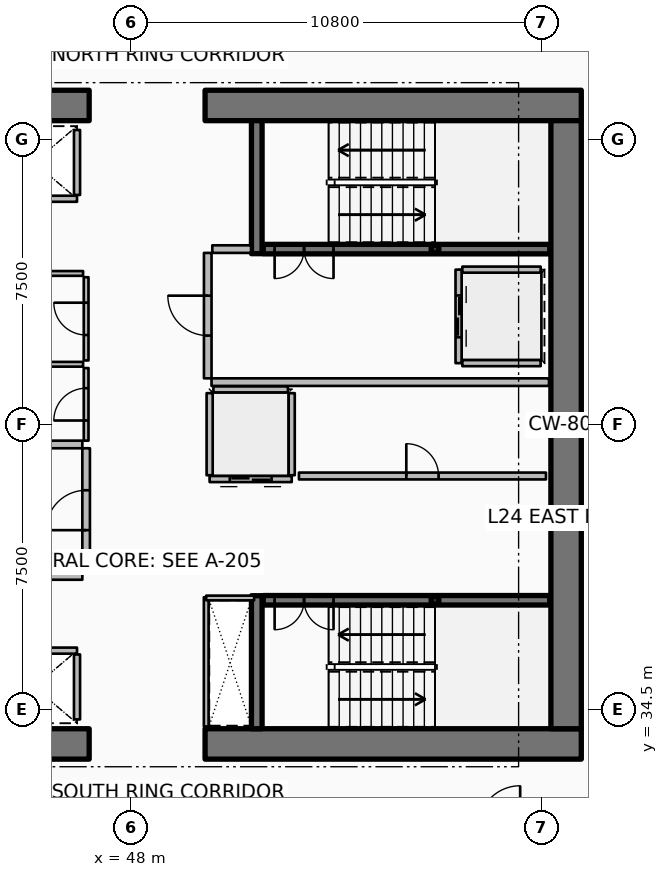
"""IFC4 building model, lengths in metres.
Left out: names, types, materials, properties, quantities, classifications, styles, units other than length and angle.
Written with IfcOpenShell. Run it as: python <this file> out.ifc"""

import sys

from ifc_helpers import new_model, si_unit, direction, frame, frame_2d, origin, origin_2d, place, context, subcontext, project, spatial, rectangle, hollow_rectangle, extrude, element, fill, save


model = new_model("IFC4")
c1 = context("Model", 3, precision=1e-05, world=origin(), true_north=direction((0.0, 1.0)))
c2 = subcontext(c1, "Body", "Model", "MODEL_VIEW")
j1 = project(units=[si_unit("LENGTHUNIT", "METRE"), si_unit("PLANEANGLEUNIT", "RADIAN")], contexts=[c1])
p1 = place(None, origin())
s1 = spatial("IfcSite", under=j1, at=p1, CompositionType="ELEMENT")
p2 = place(p1, origin())
s2 = spatial("IfcBuilding", under=s1, at=p2, CompositionType="ELEMENT")
p3 = place(p2, frame((0.0, 0.0, 97.65)))
s3 = spatial("IfcBuildingStorey", under=s2, at=p3, CompositionType="ELEMENT", Elevation=97.65)
p4 = place(p3, frame((37.0, 33.6, 0.0), z_axis=(0.0, 0.0, 1.0), x_axis=(1.0, 0.0, 0.0)))
e1 = element("IfcWall", 1, at=p4, inside=s3, PredefinedType="SHEAR", context=c2, shape_type="SweptSolid", body=[
    extrude(rectangle(XDim=9.9, YDim=0.8, at=frame_2d((4.95, 0.0))), origin(), (0.0, 0.0, 1.0), 3.75),
])
p5 = place(p3, frame((49.95, 33.6, 0.0), z_axis=(0.0, 0.0, 1.0), x_axis=(1.0, 0.0, 0.0)))
e2 = element("IfcWall", 2, at=p5, inside=s3, PredefinedType="SHEAR", context=c2, shape_type="SweptSolid", body=[
    extrude(rectangle(XDim=9.9, YDim=0.8, at=frame_2d((4.95, 0.0))), origin(), (0.0, 0.0, 1.0), 3.75),
])
p6 = place(p3, frame((37.0, 50.4, 0.0), z_axis=(0.0, 0.0, 1.0), x_axis=(1.0, 0.0, 0.0)))
e3 = element("IfcWall", 3, at=p6, inside=s3, PredefinedType="SHEAR", context=c2, shape_type="SweptSolid", body=[
    extrude(rectangle(XDim=9.9, YDim=0.8, at=frame_2d((4.95, 0.0))), origin(), (0.0, 0.0, 1.0), 3.75),
])
p7 = place(p3, frame((49.95, 50.4, 0.0), z_axis=(0.0, 0.0, 1.0), x_axis=(1.0, 0.0, 0.0)))
e4 = element("IfcWall", 4, at=p7, inside=s3, PredefinedType="SHEAR", context=c2, shape_type="SweptSolid", body=[
    extrude(rectangle(XDim=9.9, YDim=0.8, at=frame_2d((4.95, 0.0))), origin(), (0.0, 0.0, 1.0), 3.75),
])
p8 = place(p3, frame((59.45, 34.0, 0.0), z_axis=(0.0, 0.0, 1.0), x_axis=(0.0, 1.0, 0.0)))
e5 = element("IfcWall", 5, at=p8, inside=s3, PredefinedType="SHEAR", context=c2, shape_type="SweptSolid", body=[
    extrude(rectangle(XDim=16.0, YDim=0.8, at=frame_2d((8.0, 0.0))), origin(), (0.0, 0.0, 1.0), 3.75),
])
for number, where, z_axis, x_axis in (
    (6, (51.31, 46.5, 0.0), (0.0, 0.0, 1.0), (0.0, 1.0, 0.0)),
    (7, (51.31, 34.0, 0.0), (0.0, 0.0, 1.0), (0.0, 1.0, 0.0)),
):
    element("IfcWall", number, at=place(p3, frame(where, z_axis=z_axis, x_axis=x_axis)), inside=s3, PredefinedType="SHEAR", context=c2, shape_type="SweptSolid", body=[
        extrude(rectangle(XDim=3.5, YDim=0.28, at=frame_2d((1.75, 0.0))), origin(), (0.0, 0.0, 1.0), 3.75),
    ])
for number, where, z_axis, x_axis in (
    (8, (56.0, 46.62, 0.0), (0.0, 0.0, 1.0), (1.0, 0.0, 0.0)),
    (9, (56.0, 37.38, 0.0), (0.0, 0.0, 1.0), (1.0, 0.0, 0.0)),
):
    element("IfcColumn", number, at=place(p3, frame(where, z_axis=z_axis, x_axis=x_axis)), inside=s3, PredefinedType="COLUMN", context=c2, shape_type="SweptSolid", body=[
        extrude(hollow_rectangle(XDim=0.2, YDim=0.2, WallThickness=0.01, InnerFilletRadius=0.01, OuterFilletRadius=0.02, at=origin_2d()), origin(), (0.0, 0.0, 1.0), 1.67),
    ])
p9 = place(p3, frame((51.48, 46.62, 0.0), z_axis=(0.0, 0.0, 1.0), x_axis=(1.0, 0.0, 0.0)))
e10 = element("IfcWall", 10, at=p9, inside=s3, PredefinedType="SOLIDWALL", context=c2, shape_type="SweptSolid", body=[
    extrude(rectangle(XDim=7.54, YDim=0.25, at=frame_2d((3.77, 0.0))), origin(), (0.0, 0.0, 1.0), 3.5),
])
p10 = place(p9, frame((0.3, 0.0, 0.0)))
e11 = element("IfcOpeningElement", 11, at=p10, cuts=e10, PredefinedType="OPENING", context=c2, shape_type="SweptSolid", body=[
    extrude(rectangle(XDim=1.55, YDim=2.15, at=frame_2d((0.775, 1.075))), frame((0.0, 0.135, 0.0), z_axis=(0.0, -1.0, 0.0), x_axis=(1.0, 0.0, 0.0)), (0.0, 0.0, 1.0), 0.27),
])
p11 = place(p3, frame((51.48, 37.38, 0.0), z_axis=(0.0, 0.0, 1.0), x_axis=(1.0, 0.0, 0.0)))
e12 = element("IfcWall", 12, at=p11, inside=s3, PredefinedType="SOLIDWALL", context=c2, shape_type="SweptSolid", body=[
    extrude(rectangle(XDim=7.54, YDim=0.25, at=frame_2d((3.77, 0.0))), origin(), (0.0, 0.0, 1.0), 3.5),
])
p12 = place(p11, frame((0.3, 0.0, 0.0)))
e13 = element("IfcOpeningElement", 13, at=p12, cuts=e12, PredefinedType="OPENING", context=c2, shape_type="SweptSolid", body=[
    extrude(rectangle(XDim=1.55, YDim=2.15, at=frame_2d((0.775, 1.075))), frame((0.0, 0.135, 0.0), z_axis=(0.0, -1.0, 0.0), x_axis=(1.0, 0.0, 0.0)), (0.0, 0.0, 1.0), 0.27),
])
p13 = place(p3, frame((46.58, 47.945, 0.0), z_axis=(0.0, 0.0, 1.0), x_axis=(-1.0, 0.0, 0.0)))
e14 = element("IfcWall", 14, at=p13, inside=s3, PredefinedType="PARTITIONING", context=c2, shape_type="SweptSolid", body=[
    extrude(rectangle(XDim=2.26, YDim=0.16, at=frame_2d((1.13, 0.0))), origin(), (0.0, 0.0, 1.0), 3.5),
])
p14 = place(p3, frame((46.58, 48.045, 0.0), z_axis=(0.0, 0.0, 1.0), x_axis=(0.0, 1.0, 0.0)))
e15 = element("IfcWall", 15, at=p14, inside=s3, PredefinedType="PARTITIONING", context=c2, shape_type="SweptSolid", body=[
    extrude(rectangle(XDim=1.71, YDim=0.16, at=frame_2d((0.855, 0.0))), origin(), (0.0, 0.0, 1.0), 3.5),
])
p15 = place(p3, frame((44.32, 36.055, 0.0), z_axis=(0.0, 0.0, 1.0), x_axis=(1.0, 0.0, 0.0)))
e16 = element("IfcWall", 16, at=p15, inside=s3, PredefinedType="PARTITIONING", context=c2, shape_type="SweptSolid", body=[
    extrude(rectangle(XDim=2.26, YDim=0.16, at=frame_2d((1.13, 0.0))), origin(), (0.0, 0.0, 1.0), 3.5),
])
p16 = place(p3, frame((46.58, 34.245, 0.0), z_axis=(0.0, 0.0, 1.0), x_axis=(0.0, 1.0, 0.0)))
e17 = element("IfcWall", 17, at=p16, inside=s3, PredefinedType="PARTITIONING", context=c2, shape_type="SweptSolid", body=[
    extrude(rectangle(XDim=1.71, YDim=0.16, at=frame_2d((0.855, 0.0))), origin(), (0.0, 0.0, 1.0), 3.5),
])
p17 = place(p3, frame((56.62, 46.08, 0.0), z_axis=(0.0, 0.0, 1.0), x_axis=(0.0, -1.0, 0.0)))
e18 = element("IfcWall", 18, at=p17, inside=s3, PredefinedType="PARTITIONING", context=c2, shape_type="SweptSolid", body=[
    extrude(rectangle(XDim=2.46, YDim=0.16, at=frame_2d((1.23, 0.0))), origin(), (0.0, 0.0, 1.0), 3.5),
])
p18 = place(p17, frame((0.68, 0.0, 0.0)))
e19 = element("IfcOpeningElement", 19, at=p18, cuts=e18, PredefinedType="OPENING", context=c2, shape_type="SweptSolid", body=[
    extrude(rectangle(XDim=1.1, YDim=2.1, at=frame_2d((0.55, 1.05))), frame((0.0, 0.09, 0.0), z_axis=(0.0, -1.0, 0.0), x_axis=(1.0, 0.0, 0.0)), (0.0, 0.0, 1.0), 0.18),
])
for number, where, z_axis, x_axis in (
    (20, (56.72, 46.08, 0.0), (0.0, 0.0, 1.0), (1.0, 0.0, 0.0)),
    (21, (56.72, 43.62, 0.0), (0.0, 0.0, 1.0), (1.0, 0.0, 0.0)),
):
    element("IfcWall", number, at=place(p3, frame(where, z_axis=z_axis, x_axis=x_axis)), inside=s3, PredefinedType="PARTITIONING", context=c2, shape_type="SweptSolid", body=[
        extrude(rectangle(XDim=2.06, YDim=0.16, at=frame_2d((1.03, 0.0))), origin(), (0.0, 0.0, 1.0), 3.5),
    ])
p19 = place(p3, frame((52.23, 40.57, 0.0), z_axis=(0.0, 0.0, 1.0), x_axis=(-1.0, 0.0, 0.0)))
e22 = element("IfcWall", 22, at=p19, inside=s3, PredefinedType="PARTITIONING", context=c2, shape_type="SweptSolid", body=[
    extrude(rectangle(XDim=2.16, YDim=0.16, at=frame_2d((1.08, 0.0))), origin(), (0.0, 0.0, 1.0), 3.5),
])
p20 = place(p19, frame((0.53, 0.0, 0.0)))
e23 = element("IfcOpeningElement", 23, at=p20, cuts=e22, PredefinedType="OPENING", context=c2, shape_type="SweptSolid", body=[
    extrude(rectangle(XDim=1.1, YDim=2.1, at=frame_2d((0.55, 1.05))), frame((0.0, 0.09, 0.0), z_axis=(0.0, -1.0, 0.0), x_axis=(1.0, 0.0, 0.0)), (0.0, 0.0, 1.0), 0.18),
])
for number, where, z_axis, x_axis in (
    (24, (52.23, 40.67, 0.0), (0.0, 0.0, 1.0), (0.0, 1.0, 0.0)),
    (25, (50.07, 40.67, 0.0), (0.0, 0.0, 1.0), (0.0, 1.0, 0.0)),
):
    element("IfcWall", number, at=place(p3, frame(where, z_axis=z_axis, x_axis=x_axis)), inside=s3, PredefinedType="PARTITIONING", context=c2, shape_type="SweptSolid", body=[
        extrude(rectangle(XDim=2.16, YDim=0.16, at=frame_2d((1.08, 0.0))), origin(), (0.0, 0.0, 1.0), 3.5),
    ])
p21 = place(p3, frame((50.17, 42.93, 0.0), z_axis=(0.0, 0.0, 1.0), x_axis=(1.0, 0.0, 0.0)))
e26 = element("IfcWall", 26, at=p21, inside=s3, PredefinedType="PARTITIONING", context=c2, shape_type="SweptSolid", body=[
    extrude(rectangle(XDim=1.96, YDim=0.16, at=frame_2d((0.98, 0.0))), origin(), (0.0, 0.0, 1.0), 3.5),
])
p22 = place(p3, frame((52.42, 40.65, 0.0), z_axis=(0.0, 0.0, 1.0), x_axis=(1.0, 0.0, 0.0)))
e27 = element("IfcWall", 27, at=p22, inside=s3, PredefinedType="PARTITIONING", context=c2, shape_type="SweptSolid", body=[
    extrude(rectangle(XDim=6.5, YDim=0.18, at=frame_2d((3.25, 0.0))), origin(), (0.0, 0.0, 1.0), 3.5),
])
p23 = place(p22, frame((2.825, 0.0, 0.0)))
e28 = element("IfcOpeningElement", 28, at=p23, cuts=e27, PredefinedType="OPENING", context=c2, shape_type="SweptSolid", body=[
    extrude(rectangle(XDim=0.85, YDim=2.06, at=frame_2d((0.425, 1.03))), frame((0.0, 0.1, 0.0), z_axis=(0.0, -1.0, 0.0), x_axis=(1.0, 0.0, 0.0)), (0.0, 0.0, 1.0), 0.2),
])
p24 = place(p3, frame((41.35, 38.02, 0.0), z_axis=(0.0, 0.0, 1.0), x_axis=(1.0, 0.0, 0.0)))
e29 = element("IfcWall", 29, at=p24, inside=s3, PredefinedType="PARTITIONING", context=c2, shape_type="SweptSolid", body=[
    extrude(rectangle(XDim=5.37, YDim=0.2, at=frame_2d((2.685, 0.0))), origin(), (0.0, 0.0, 1.0), 3.5),
])
p25 = place(p3, frame((43.92, 41.48, 0.0), z_axis=(0.0, 0.0, 1.0), x_axis=(1.0, 0.0, 0.0)))
e30 = element("IfcWall", 30, at=p25, inside=s3, PredefinedType="PARTITIONING", context=c2, shape_type="SweptSolid", body=[
    extrude(rectangle(XDim=2.8, YDim=0.2, at=frame_2d((1.4, 0.0))), origin(), (0.0, 0.0, 1.0), 3.5),
])
p26 = place(p3, frame((46.82, 38.12, 0.0), z_axis=(0.0, 0.0, 1.0), x_axis=(0.0, 1.0, 0.0)))
e31 = element("IfcWall", 31, at=p26, inside=s3, PredefinedType="PARTITIONING", context=c2, shape_type="SweptSolid", body=[
    extrude(rectangle(XDim=3.26, YDim=0.2, at=frame_2d((1.63, 0.0))), origin(), (0.0, 0.0, 1.0), 3.5),
])
p27 = place(p26, frame((1.105, 0.0, 0.0)))
e32 = element("IfcOpeningElement", 32, at=p27, cuts=e31, PredefinedType="OPENING", context=c2, shape_type="SweptSolid", body=[
    extrude(rectangle(XDim=1.05, YDim=2.1, at=frame_2d((0.525, 1.05))), frame((0.0, 0.11, 0.0), z_axis=(0.0, -1.0, 0.0), x_axis=(1.0, 0.0, 0.0)), (0.0, 0.0, 1.0), 0.22),
])
p28 = place(p3, frame((50.12, 43.12, 0.0), z_axis=(0.0, 0.0, 1.0), x_axis=(1.0, 0.0, 0.0)))
e33 = element("IfcWall", 33, at=p28, inside=s3, PredefinedType="PARTITIONING", context=c2, shape_type="SweptSolid", body=[
    extrude(rectangle(XDim=8.88, YDim=0.2, at=frame_2d((4.44, 0.0))), origin(), (0.0, 0.0, 1.0), 3.5),
])
p29 = place(p3, frame((50.14, 46.62, 0.0), z_axis=(0.0, 0.0, 1.0), x_axis=(1.0, 0.0, 0.0)))
e34 = element("IfcWall", 34, at=p29, inside=s3, PredefinedType="PARTITIONING", context=c2, shape_type="SweptSolid", body=[
    extrude(rectangle(XDim=1.02, YDim=0.2, at=frame_2d((0.51, 0.0))), origin(), (0.0, 0.0, 1.0), 3.5),
])
p30 = place(p3, frame((50.02, 43.22, 0.0), z_axis=(0.0, 0.0, 1.0), x_axis=(0.0, 1.0, 0.0)))
e35 = element("IfcWall", 35, at=p30, inside=s3, PredefinedType="PARTITIONING", context=c2, shape_type="SweptSolid", body=[
    extrude(rectangle(XDim=3.3, YDim=0.2, at=frame_2d((1.65, 0.0))), origin(), (0.0, 0.0, 1.0), 3.5),
])
p31 = place(p30, frame((1.125, 0.0, 0.0)))
e36 = element("IfcOpeningElement", 36, at=p31, cuts=e35, PredefinedType="OPENING", context=c2, shape_type="SweptSolid", body=[
    extrude(rectangle(XDim=1.05, YDim=2.1, at=frame_2d((0.525, 1.05))), frame((0.0, 0.11, 0.0), z_axis=(0.0, -1.0, 0.0), x_axis=(1.0, 0.0, 0.0)), (0.0, 0.0, 1.0), 0.22),
])
p32 = place(p3, frame((49.98, 34.06, 0.0), z_axis=(0.0, 0.0, 1.0), x_axis=(0.0, 1.0, 0.0)))
e37 = element("IfcWall", 37, at=p32, inside=s3, PredefinedType="PARTITIONING", context=c2, shape_type="SweptSolid", body=[
    extrude(rectangle(XDim=3.4, YDim=0.125, at=frame_2d((1.7, 0.0))), origin(), (0.0, 0.0, 1.0), 2.94),
])
p33 = place(p3, frame((49.98, 37.44, 0.0), z_axis=(0.0, 0.0, 1.0), x_axis=(1.0, 0.0, 0.0)))
e38 = element("IfcWall", 38, at=p33, inside=s3, PredefinedType="PARTITIONING", context=c2, shape_type="SweptSolid", body=[
    extrude(rectangle(XDim=1.26, YDim=0.125, at=frame_2d((0.63, 0.0))), origin(), (0.0, 0.0, 1.0), 2.94),
])
p34 = place(p3, frame((44.03, 43.59, 0.0), z_axis=(0.0, 0.0, 1.0), x_axis=(1.0, 0.0, 0.0)))
e39 = element("IfcWall", 39, at=p34, inside=s3, PredefinedType="PARTITIONING", context=c2, shape_type="SweptSolid", body=[
    extrude(rectangle(XDim=2.71, YDim=0.125, at=frame_2d((1.355, 0.0))), origin(), (0.0, 0.0, 1.0), 2.94),
])
p35 = place(p3, frame((46.82, 41.58, 0.0), z_axis=(0.0, 0.0, 1.0), x_axis=(0.0, 1.0, 0.0)))
e40 = element("IfcWall", 40, at=p35, inside=s3, PredefinedType="PARTITIONING", context=c2, shape_type="SweptSolid", body=[
    extrude(rectangle(XDim=1.91, YDim=0.125, at=frame_2d((0.955, 0.0))), origin(), (0.0, 0.0, 1.0), 2.94),
])
p36 = place(p35, frame((0.53, 0.0, 0.0)))
e41 = element("IfcOpeningElement", 41, at=p36, cuts=e40, PredefinedType="OPENING", context=c2, shape_type="SweptSolid", body=[
    extrude(rectangle(XDim=0.85, YDim=2.06, at=frame_2d((0.425, 1.03))), frame((0.0, 0.073, 0.0), z_axis=(0.0, -1.0, 0.0), x_axis=(1.0, 0.0, 0.0)), (0.0, 0.0, 1.0), 0.145),
])
p37 = place(p3, frame((46.82, 43.69, 0.0), z_axis=(0.0, 0.0, 1.0), x_axis=(0.0, 1.0, 0.0)))
e42 = element("IfcWall", 42, at=p37, inside=s3, PredefinedType="PARTITIONING", context=c2, shape_type="SweptSolid", body=[
    extrude(rectangle(XDim=2.19, YDim=0.125, at=frame_2d((1.095, 0.0))), origin(), (0.0, 0.0, 1.0), 2.94),
])
p38 = place(p37, frame((0.67, 0.0, 0.0)))
e43 = element("IfcOpeningElement", 43, at=p38, cuts=e42, PredefinedType="OPENING", context=c2, shape_type="SweptSolid", body=[
    extrude(rectangle(XDim=0.85, YDim=2.06, at=frame_2d((0.425, 1.03))), frame((0.0, 0.073, 0.0), z_axis=(0.0, -1.0, 0.0), x_axis=(1.0, 0.0, 0.0)), (0.0, 0.0, 1.0), 0.145),
])
p39 = place(p3, frame((45.48, 45.98, 0.0), z_axis=(0.0, 0.0, 1.0), x_axis=(1.0, 0.0, 0.0)))
e44 = element("IfcWall", 44, at=p39, inside=s3, PredefinedType="PARTITIONING", context=c2, shape_type="SweptSolid", body=[
    extrude(rectangle(XDim=1.26, YDim=0.125, at=frame_2d((0.63, 0.0))), origin(), (0.0, 0.0, 1.0), 2.94),
])
p40 = place(p10, origin())
e45 = element("IfcDoor", 45, at=p40, inside=s3, OperationType="DOUBLE_DOOR_SINGLE_SWING", PredefinedType="DOOR", context=c2, shape_type="SweptSolid", body=[
    extrude(rectangle(XDim=1.55, YDim=2.15, at=frame_2d((0.775, 1.075))), frame((0.0, 0.025, 0.0), z_axis=(0.0, -1.0, 0.0), x_axis=(1.0, 0.0, 0.0)), (0.0, 0.0, 1.0), 0.05),
])
fill(e11, e45)
p41 = place(p12, origin())
e46 = element("IfcDoor", 46, at=p41, inside=s3, OperationType="DOUBLE_DOOR_SINGLE_SWING", PredefinedType="DOOR", context=c2, shape_type="SweptSolid", body=[
    extrude(rectangle(XDim=1.55, YDim=2.15, at=frame_2d((0.775, 1.075))), frame((0.0, 0.025, 0.0), z_axis=(0.0, -1.0, 0.0), x_axis=(1.0, 0.0, 0.0)), (0.0, 0.0, 1.0), 0.05),
])
fill(e13, e46)
p42 = place(p18, origin())
e47 = element("IfcDoor", 47, at=p42, inside=s3, OperationType="DOUBLE_DOOR_SLIDING", PredefinedType="DOOR", context=c2, shape_type="SweptSolid", body=[
    extrude(rectangle(XDim=1.1, YDim=2.1, at=frame_2d((0.55, 1.05))), frame((0.0, 0.025, 0.0), z_axis=(0.0, -1.0, 0.0), x_axis=(1.0, 0.0, 0.0)), (0.0, 0.0, 1.0), 0.05),
])
fill(e19, e47)
p43 = place(p20, origin())
e48 = element("IfcDoor", 48, at=p43, inside=s3, OperationType="DOUBLE_DOOR_SLIDING", PredefinedType="DOOR", context=c2, shape_type="SweptSolid", body=[
    extrude(rectangle(XDim=1.1, YDim=2.1, at=frame_2d((0.55, 1.05))), frame((0.0, 0.025, 0.0), z_axis=(0.0, -1.0, 0.0), x_axis=(1.0, 0.0, 0.0)), (0.0, 0.0, 1.0), 0.05),
])
fill(e23, e48)
p44 = place(p23, origin())
e49 = element("IfcDoor", 49, at=p44, inside=s3, OperationType="SINGLE_SWING_LEFT", PredefinedType="DOOR", context=c2, shape_type="SweptSolid", body=[
    extrude(rectangle(XDim=0.85, YDim=2.06, at=frame_2d((0.425, 1.03))), frame((0.0, 0.025, 0.0), z_axis=(0.0, -1.0, 0.0), x_axis=(1.0, 0.0, 0.0)), (0.0, 0.0, 1.0), 0.05),
])
fill(e28, e49)
p45 = place(p27, origin())
e50 = element("IfcDoor", 50, at=p45, inside=s3, OperationType="SINGLE_SWING_LEFT", PredefinedType="DOOR", context=c2, shape_type="SweptSolid", body=[
    extrude(rectangle(XDim=1.05, YDim=2.1, at=frame_2d((0.525, 1.05))), frame((0.0, 0.025, 0.0), z_axis=(0.0, -1.0, 0.0), x_axis=(1.0, 0.0, 0.0)), (0.0, 0.0, 1.0), 0.05),
])
fill(e32, e50)
p46 = place(p31, origin())
e51 = element("IfcDoor", 51, at=p46, inside=s3, OperationType="SINGLE_SWING_RIGHT", PredefinedType="DOOR", context=c2, shape_type="SweptSolid", body=[
    extrude(rectangle(XDim=1.05, YDim=2.1, at=frame_2d((0.525, 1.05))), frame((0.0, 0.025, 0.0), z_axis=(0.0, -1.0, 0.0), x_axis=(1.0, 0.0, 0.0)), (0.0, 0.0, 1.0), 0.05),
])
fill(e36, e51)
p47 = place(p36, origin())
e52 = element("IfcDoor", 52, at=p47, inside=s3, OperationType="SINGLE_SWING_LEFT", PredefinedType="DOOR", context=c2, shape_type="SweptSolid", body=[
    extrude(rectangle(XDim=0.85, YDim=2.06, at=frame_2d((0.425, 1.03))), frame((0.0, 0.025, 0.0), z_axis=(0.0, -1.0, 0.0), x_axis=(1.0, 0.0, 0.0)), (0.0, 0.0, 1.0), 0.05),
])
fill(e41, e52)
p48 = place(p38, origin())
e53 = element("IfcDoor", 53, at=p48, inside=s3, OperationType="SINGLE_SWING_RIGHT", PredefinedType="DOOR", context=c2, shape_type="SweptSolid", body=[
    extrude(rectangle(XDim=0.85, YDim=2.06, at=frame_2d((0.425, 1.03))), frame((0.0, 0.025, 0.0), z_axis=(0.0, -1.0, 0.0), x_axis=(1.0, 0.0, 0.0)), (0.0, 0.0, 1.0), 0.05),
])
fill(e43, e53)
save(model, sys.argv[1])
